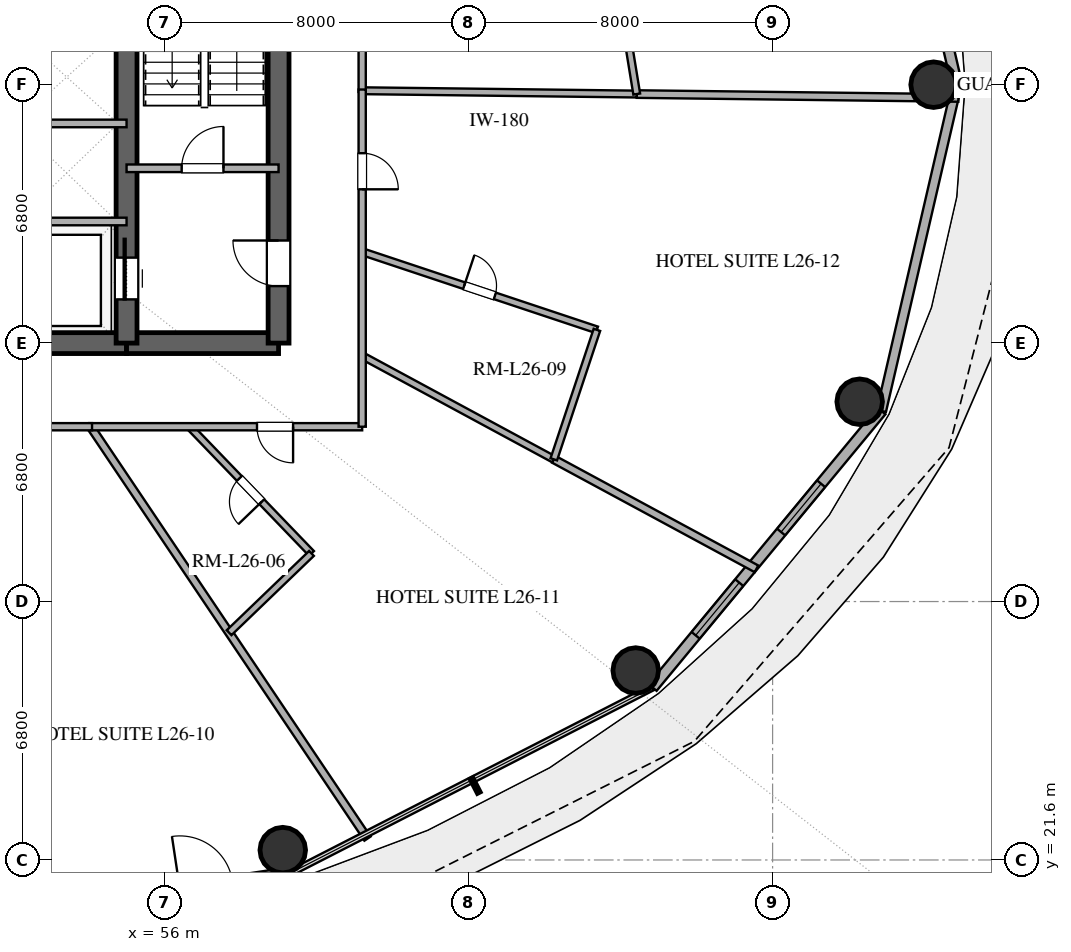
"""IFC4 building model, lengths in metres.
Left out: names, types, materials, properties, quantities, classifications, styles, units other than length and angle.
Written with IfcOpenShell. Run it as: python <this file> out.ifc"""

import sys

from ifc_helpers import new_model, si_unit, direction, frame, frame_2d, origin, origin_2d, place, context, subcontext, project, spatial, rectangle, hollow_circle, extrude, element, fill, save


model = new_model("IFC4")
c1 = context("Model", 3, precision=1e-05, world=origin(), true_north=direction((0.0, 1.0)))
c2 = subcontext(c1, "Body", "Model", "MODEL_VIEW")
j1 = project(units=[si_unit("LENGTHUNIT", "METRE"), si_unit("PLANEANGLEUNIT", "RADIAN")], contexts=[c1])
p1 = place(None, origin())
s1 = spatial("IfcSite", under=j1, at=p1, CompositionType="ELEMENT")
p2 = place(p1, origin())
s2 = spatial("IfcBuilding", under=s1, at=p2, CompositionType="ELEMENT")
p3 = place(p2, frame((0.0, 0.0, 105.6)))
s3 = spatial("IfcBuildingStorey", under=s2, at=p3, CompositionType="ELEMENT", Elevation=105.6)
p4 = place(p3, frame((41.0, 35.2, 0.0), z_axis=(0.0, 0.0, 1.0), x_axis=(1.0, 0.0, 0.0)))
e1 = element("IfcWall", 1, at=p4, inside=s3, PredefinedType="SHEAR", context=c2, shape_type="SweptSolid", body=[
    extrude(rectangle(XDim=14.0, YDim=0.55, at=frame_2d((7.0, 0.0))), origin(), (0.0, 0.0, 1.0), 3.38),
])
p5 = place(p4, frame((6.1, 0.0, 0.0)))
e2 = element("IfcOpeningElement", 2, at=p5, cuts=e1, PredefinedType="OPENING", context=c2, shape_type="SweptSolid", body=[
    extrude(rectangle(XDim=1.8, YDim=2.25, at=frame_2d((0.9, 1.125))), frame((0.0, 0.285, 0.0), z_axis=(0.0, -1.0, 0.0), x_axis=(1.0, 0.0, 0.0)), (0.0, 0.0, 1.0), 0.57),
])
p6 = place(p3, frame((55.0, 35.2, 0.0), z_axis=(0.0, 0.0, 1.0), x_axis=(1.0, 0.0, 0.0)))
e3 = element("IfcWall", 3, at=p6, inside=s3, PredefinedType="SHEAR", context=c2, shape_type="SweptSolid", body=[
    extrude(rectangle(XDim=4.0, YDim=0.55, at=frame_2d((2.0, 0.0))), origin(), (0.0, 0.0, 1.0), 3.38),
])
p7 = place(p3, frame((59.0, 35.2, 0.0), z_axis=(0.0, 0.0, 1.0), x_axis=(0.0, 1.0, 0.0)))
e4 = element("IfcWall", 4, at=p7, inside=s3, PredefinedType="SHEAR", context=c2, shape_type="SweptSolid", body=[
    extrude(rectangle(XDim=13.6, YDim=0.55, at=frame_2d((6.8, 0.0))), origin(), (0.0, 0.0, 1.0), 3.38),
])
p8 = place(p7, frame((1.5, 0.0, 0.0)))
e5 = element("IfcOpeningElement", 5, at=p8, cuts=e4, PredefinedType="OPENING", context=c2, shape_type="SweptSolid", body=[
    extrude(rectangle(XDim=1.2, YDim=2.15, at=frame_2d((0.6, 1.075))), frame((0.0, 0.285, 0.0), z_axis=(0.0, -1.0, 0.0), x_axis=(1.0, 0.0, 0.0)), (0.0, 0.0, 1.0), 0.57),
])
p9 = place(p3, frame((55.0, 35.2, 0.0), z_axis=(0.0, 0.0, 1.0), x_axis=(0.0, 1.0, 0.0)))
e6 = element("IfcWall", 6, at=p9, inside=s3, PredefinedType="SHEAR", context=c2, shape_type="SweptSolid", body=[
    extrude(rectangle(XDim=13.6, YDim=0.55, at=frame_2d((6.8, 0.0))), origin(), (0.0, 0.0, 1.0), 3.38),
])
p10 = place(p9, frame((1.15, 0.0, 0.0)))
e7 = element("IfcOpeningElement", 7, at=p10, cuts=e6, PredefinedType="OPENING", context=c2, shape_type="SweptSolid", body=[
    extrude(rectangle(XDim=1.1, YDim=2.2, at=frame_2d((0.55, 1.1))), frame((0.0, 0.285, 0.0), z_axis=(0.0, -1.0, 0.0), x_axis=(1.0, 0.0, 0.0)), (0.0, 0.0, 1.0), 0.57),
])
for number, where, z_axis, x_axis in (
    (8, (76.237, 42.0, 0.0), (0.0, 0.0, 1.0), (1.0, 0.0, 0.0)),
    (9, (59.11, 21.859, 0.0), (0.0, 0.0, 1.0), (1.0, 0.0, 0.0)),
    (10, (68.398, 26.585, 0.0), (0.0, 0.0, 1.0), (1.0, 0.0, 0.0)),
    (11, (74.291, 33.657, 0.0), (0.0, 0.0, 1.0), (1.0, 0.0, 0.0)),
):
    element("IfcColumn", number, at=place(p3, frame(where, z_axis=z_axis, x_axis=x_axis)), inside=s3, PredefinedType="COLUMN", context=c2, shape_type="SweptSolid", body=[
        extrude(hollow_circle(Radius=0.6, WallThickness=0.032, at=origin_2d()), origin(), (0.0, 0.0, 1.0), 3.38),
    ])
p11 = place(p3, frame((76.849, 42.0, 0.0), z_axis=(0.0, 0.0, 1.0), x_axis=(-0.22558597182, 0.974223264616, 0.0)))
e12 = element("IfcWall", 12, at=p11, inside=s3, PredefinedType="SOLIDWALL", context=c2, shape_type="SweptSolid", body=[
    extrude(rectangle(XDim=8.811, YDim=0.28, at=frame_2d((4.405, 0.0))), origin(), (0.0, 0.0, 1.0), 3.38),
])
p12 = place(p11, frame((6.175, 0.0, 0.0)))
e13 = element("IfcOpeningElement", 13, at=p12, cuts=e12, PredefinedType="OPENING", context=c2, shape_type="SweptSolid", body=[
    extrude(rectangle(XDim=1.1, YDim=2.25, at=frame_2d((0.55, 1.125))), frame((0.0, 0.15, 0.0), z_axis=(0.0, -1.0, 0.0), x_axis=(1.0, 0.0, 0.0)), (0.0, 0.0, 1.0), 0.3),
])
p13 = place(p3, frame((48.0, 19.57, 0.0), z_axis=(0.0, 0.0, 1.0), x_axis=(0.988877774656, 0.148730450117, 0.0)))
e14 = element("IfcWall", 14, at=p13, inside=s3, PredefinedType="SOLIDWALL", context=c2, shape_type="SweptSolid", body=[
    extrude(rectangle(XDim=11.479, YDim=0.28, at=frame_2d((5.74, 0.0))), origin(), (0.0, 0.0, 1.0), 3.38),
])
p14 = place(p13, frame((8.497, 0.0, 0.0)))
e15 = element("IfcOpeningElement", 15, at=p14, cuts=e14, PredefinedType="OPENING", context=c2, shape_type="SweptSolid", body=[
    extrude(rectangle(XDim=1.4, YDim=2.2, at=frame_2d((0.7, 1.1))), frame((0.0, 0.15, 0.0), z_axis=(0.0, -1.0, 0.0), x_axis=(1.0, 0.0, 0.0)), (0.0, 0.0, 1.0), 0.3),
])
p15 = place(p3, frame((68.84, 26.14, 0.0), z_axis=(0.0, 0.0, 1.0), x_axis=(0.637505817448, 0.770445541696, 0.0)))
e16 = element("IfcWall", 16, at=p15, inside=s3, PredefinedType="SOLIDWALL", context=c2, shape_type="SweptSolid", body=[
    extrude(rectangle(XDim=9.445, YDim=0.28, at=frame_2d((4.723, 0.0))), origin(), (0.0, 0.0, 1.0), 3.38),
])
p16 = place(p15, frame((1.78, 0.0, 0.85)))
e17 = element("IfcOpeningElement", 17, at=p16, cuts=e16, PredefinedType="OPENING", context=c2, shape_type="SweptSolid", body=[
    extrude(rectangle(XDim=1.8, YDim=2.2, at=frame_2d((0.9, 1.1))), frame((0.0, 0.15, 0.0), z_axis=(0.0, -1.0, 0.0), x_axis=(1.0, 0.0, 0.0)), (0.0, 0.0, 1.0), 0.3),
])
p17 = place(p15, frame((5.308, 0.0, 0.85)))
e18 = element("IfcOpeningElement", 18, at=p17, cuts=e16, PredefinedType="OPENING", context=c2, shape_type="SweptSolid", body=[
    extrude(rectangle(XDim=1.65, YDim=2.0, at=frame_2d((0.825, 1.0))), frame((0.0, 0.15, 0.0), z_axis=(0.0, -1.0, 0.0), x_axis=(1.0, 0.0, 0.0)), (0.0, 0.0, 1.0), 0.3),
])
p18 = place(p3, frame((74.861, 33.417, 0.0), z_axis=(0.0, 0.0, 1.0), x_axis=(0.22558597182, 0.974223264616, 0.0)))
e19 = element("IfcWall", 19, at=p18, inside=s3, PredefinedType="SOLIDWALL", context=c2, shape_type="SweptSolid", body=[
    extrude(rectangle(XDim=8.811, YDim=0.25, at=frame_2d((4.405, 0.0))), origin(), (0.0, 0.0, 1.0), 3.38),
])
p19 = place(p3, frame((55.0, 39.8, 0.0), z_axis=(0.0, 0.0, 1.0), x_axis=(1.0, 0.0, 0.0)))
e20 = element("IfcWall", 20, at=p19, inside=s3, PredefinedType="SOLIDWALL", context=c2, shape_type="SweptSolid", body=[
    extrude(rectangle(XDim=4.0, YDim=0.2, at=frame_2d((2.0, 0.0))), origin(), (0.0, 0.0, 1.0), 2.74),
])
p20 = place(p19, frame((1.45, 0.0, 0.0)))
e21 = element("IfcOpeningElement", 21, at=p20, cuts=e20, PredefinedType="OPENING", context=c2, shape_type="SweptSolid", body=[
    extrude(rectangle(XDim=1.1, YDim=2.15, at=frame_2d((0.55, 1.075))), frame((0.0, 0.11, 0.0), z_axis=(0.0, -1.0, 0.0), x_axis=(1.0, 0.0, 0.0)), (0.0, 0.0, 1.0), 0.22),
])
for number, where, z_axis, x_axis in (
    (22, (52.05, 38.4, 0.0), (0.0, 0.0, 1.0), (1.0, 0.0, 0.0)),
    (23, (52.05, 40.98, 0.0), (0.0, 0.0, 1.0), (1.0, 0.0, 0.0)),
):
    element("IfcWall", number, at=place(p3, frame(where, z_axis=z_axis, x_axis=x_axis)), inside=s3, PredefinedType="SOLIDWALL", context=c2, shape_type="SweptSolid", body=[
        extrude(rectangle(XDim=2.95, YDim=0.2, at=frame_2d((1.475, 0.0))), origin(), (0.0, 0.0, 1.0), 2.74),
    ])
p21 = place(p3, frame((76.888, 41.651, 0.0), z_axis=(0.0, 0.0, 1.0), x_axis=(-0.9999269672, 0.012085539541, 0.0)))
e24 = element("IfcWall", 24, at=p21, inside=s3, PredefinedType="PARTITIONING", context=c2, shape_type="SweptSolid", body=[
    extrude(rectangle(XDim=8.464, YDim=0.2, at=frame_2d((4.232, 0.0))), origin(), (0.0, 0.0, 1.0), 2.74),
])
p22 = place(p3, frame((68.425, 41.753, 0.0), z_axis=(0.0, 0.0, 1.0), x_axis=(-0.999926833816, 0.012096570355, 0.0)))
e25 = element("IfcWall", 25, at=p22, inside=s3, PredefinedType="PLUMBINGWALL", context=c2, shape_type="SweptSolid", body=[
    extrude(rectangle(XDim=7.225, YDim=0.18, at=frame_2d((3.613, 0.0))), origin(), (0.0, 0.0, 1.0), 2.74),
])
p23 = place(p3, frame((54.053, 33.0, 0.0), z_axis=(0.0, 0.0, 1.0), x_axis=(0.558073496329, -0.829791523634, 0.0)))
e26 = element("IfcWall", 26, at=p23, inside=s3, PredefinedType="PARTITIONING", context=c2, shape_type="SweptSolid", body=[
    extrude(rectangle(XDim=13.06, YDim=0.2, at=frame_2d((6.53, 0.0))), origin(), (0.0, 0.0, 1.0), 2.74),
])
p24 = place(p3, frame((61.2, 37.605, 0.0), z_axis=(0.0, 0.0, 1.0), x_axis=(0.948788249983, -0.315912735884, 0.0)))
e27 = element("IfcWall", 27, at=p24, inside=s3, PredefinedType="PLUMBINGWALL", context=c2, shape_type="SweptSolid", body=[
    extrude(rectangle(XDim=6.51, YDim=0.18, at=frame_2d((3.255, 0.0))), origin(), (0.0, 0.0, 1.0), 2.74),
])
p25 = place(p24, frame((2.83, 0.0, 0.0)))
e28 = element("IfcOpeningElement", 28, at=p25, cuts=e27, PredefinedType="OPENING", context=c2, shape_type="SweptSolid", body=[
    extrude(rectangle(XDim=0.85, YDim=2.1, at=frame_2d((0.425, 1.05))), frame((0.0, 0.1, 0.0), z_axis=(0.0, -1.0, 0.0), x_axis=(1.0, 0.0, 0.0)), (0.0, 0.0, 1.0), 0.2),
])
p26 = place(p3, frame((71.576, 29.261, 0.0), z_axis=(0.0, 0.0, 1.0), x_axis=(-0.879774354245, 0.475391507721, 0.0)))
e29 = element("IfcWall", 29, at=p26, inside=s3, PredefinedType="PARTITIONING", context=c2, shape_type="SweptSolid", body=[
    extrude(rectangle(XDim=6.062, YDim=0.2, at=frame_2d((3.031, 0.0))), origin(), (0.0, 0.0, 1.0), 2.74),
])
p27 = place(p3, frame((66.243, 32.143, 0.0), z_axis=(0.0, 0.0, 1.0), x_axis=(-0.879784992633, 0.475371819461, 0.0)))
e30 = element("IfcWall", 30, at=p27, inside=s3, PredefinedType="PLUMBINGWALL", context=c2, shape_type="SweptSolid", body=[
    extrude(rectangle(XDim=5.732, YDim=0.18, at=frame_2d((2.866, 0.0))), origin(), (0.0, 0.0, 1.0), 2.74),
])
p28 = place(p3, frame((59.866, 29.666, 0.0), z_axis=(0.0, 0.0, 1.0), x_axis=(-0.693306956927, 0.720642396392, 0.0)))
e31 = element("IfcWall", 31, at=p28, inside=s3, PredefinedType="PLUMBINGWALL", context=c2, shape_type="SweptSolid", body=[
    extrude(rectangle(XDim=4.626, YDim=0.18, at=frame_2d((2.313, 0.0))), origin(), (0.0, 0.0, 1.0), 2.74),
])
p29 = place(p28, frame((1.888, 0.0, 0.0)))
e32 = element("IfcOpeningElement", 32, at=p29, cuts=e31, PredefinedType="OPENING", context=c2, shape_type="SweptSolid", body=[
    extrude(rectangle(XDim=0.85, YDim=2.1, at=frame_2d((0.425, 1.05))), frame((0.0, 0.1, 0.0), z_axis=(0.0, -1.0, 0.0), x_axis=(1.0, 0.0, 0.0)), (0.0, 0.0, 1.0), 0.2),
])
p30 = place(p3, frame((61.2, 33.0, 0.0), z_axis=(0.0, 0.0, 1.0), x_axis=(-1.0, 0.0, 0.0)))
e33 = element("IfcWall", 33, at=p30, inside=s3, PredefinedType="PARTITIONING", context=c2, shape_type="SweptSolid", body=[
    extrude(rectangle(XDim=7.186, YDim=0.19, at=frame_2d((3.593, 0.0))), origin(), (0.0, 0.0, 1.0), 2.74),
])
p31 = place(p30, frame((1.818, 0.0, 0.0)))
e34 = element("IfcOpeningElement", 34, at=p31, cuts=e33, PredefinedType="OPENING", context=c2, shape_type="SweptSolid", body=[
    extrude(rectangle(XDim=0.95, YDim=2.15, at=frame_2d((0.475, 1.075))), frame((0.0, 0.105, 0.0), z_axis=(0.0, -1.0, 0.0), x_axis=(1.0, 0.0, 0.0)), (0.0, 0.0, 1.0), 0.21),
])
p32 = place(p3, frame((61.2, 41.809, 0.0), z_axis=(0.0, 0.0, 1.0), x_axis=(0.0, 1.0, 0.0)))
e35 = element("IfcWall", 35, at=p32, inside=s3, PredefinedType="PARTITIONING", context=c2, shape_type="SweptSolid", body=[
    extrude(rectangle(XDim=6.917, YDim=0.19, at=frame_2d((3.458, 0.0))), origin(), (0.0, 0.0, 1.0), 2.74),
])
p33 = place(p32, frame((4.157, 0.0, 0.0)))
e36 = element("IfcOpeningElement", 36, at=p33, cuts=e35, PredefinedType="OPENING", context=c2, shape_type="SweptSolid", body=[
    extrude(rectangle(XDim=0.95, YDim=2.15, at=frame_2d((0.475, 1.075))), frame((0.0, 0.105, 0.0), z_axis=(0.0, -1.0, 0.0), x_axis=(1.0, 0.0, 0.0)), (0.0, 0.0, 1.0), 0.21),
])
p34 = place(p3, frame((61.2, 41.873, 0.0), z_axis=(0.0, 0.0, 1.0), x_axis=(0.0, -1.0, 0.0)))
e37 = element("IfcWall", 37, at=p34, inside=s3, PredefinedType="PARTITIONING", context=c2, shape_type="SweptSolid", body=[
    extrude(rectangle(XDim=8.873, YDim=0.19, at=frame_2d((4.436, 0.0))), origin(), (0.0, 0.0, 1.0), 2.74),
])
p35 = place(p34, frame((1.676, 0.0, 0.0)))
e38 = element("IfcOpeningElement", 38, at=p35, cuts=e37, PredefinedType="OPENING", context=c2, shape_type="SweptSolid", body=[
    extrude(rectangle(XDim=0.95, YDim=2.15, at=frame_2d((0.475, 1.075))), frame((0.0, 0.105, 0.0), z_axis=(0.0, -1.0, 0.0), x_axis=(1.0, 0.0, 0.0)), (0.0, 0.0, 1.0), 0.21),
])
p36 = place(p3, frame((67.377, 35.548, 0.0), z_axis=(0.0, 0.0, 1.0), x_axis=(-0.315860462711, -0.948805653491, 0.0)))
e39 = element("IfcWall", 39, at=p36, inside=s3, PredefinedType="PLUMBINGWALL", context=c2, shape_type="SweptSolid", body=[
    extrude(rectangle(XDim=3.59, YDim=0.18, at=frame_2d((1.795, 0.0))), origin(), (0.0, 0.0, 1.0), 2.74),
])
p37 = place(p3, frame((67.855, 45.243, 0.0), z_axis=(0.0, 0.0, 1.0), x_axis=(0.161207379819, -0.986920554397, 0.0)))
e40 = element("IfcWall", 40, at=p37, inside=s3, PredefinedType="PLUMBINGWALL", context=c2, shape_type="SweptSolid", body=[
    extrude(rectangle(XDim=3.536, YDim=0.18, at=frame_2d((1.768, 0.0))), origin(), (0.0, 0.0, 1.0), 2.74),
])
p38 = place(p3, frame((54.092, 33.0, 0.0), z_axis=(0.0, 0.0, 1.0), x_axis=(-1.0, 0.0, 0.0)))
e41 = element("IfcWall", 41, at=p38, inside=s3, PredefinedType="PARTITIONING", context=c2, shape_type="SweptSolid", body=[
    extrude(rectangle(XDim=3.51, YDim=0.19, at=frame_2d((1.755, 0.0))), origin(), (0.0, 0.0, 1.0), 2.74),
])
p39 = place(p38, frame((1.28, 0.0, 0.0)))
e42 = element("IfcOpeningElement", 42, at=p39, cuts=e41, PredefinedType="OPENING", context=c2, shape_type="SweptSolid", body=[
    extrude(rectangle(XDim=0.95, YDim=2.15, at=frame_2d((0.475, 1.075))), frame((0.0, 0.105, 0.0), z_axis=(0.0, -1.0, 0.0), x_axis=(1.0, 0.0, 0.0)), (0.0, 0.0, 1.0), 0.21),
])
p40 = place(p3, frame((57.698, 27.58, 0.0), z_axis=(0.0, 0.0, 1.0), x_axis=(0.720688028056, 0.693259522991, 0.0)))
e43 = element("IfcWall", 43, at=p40, inside=s3, PredefinedType="PLUMBINGWALL", context=c2, shape_type="SweptSolid", body=[
    extrude(rectangle(XDim=3.009, YDim=0.18, at=frame_2d((1.504, 0.0))), origin(), (0.0, 0.0, 1.0), 2.74),
])
p41 = place(p16, origin())
e44 = element("IfcWindow", 44, at=p41, inside=s3, PartitioningType="SINGLE_PANEL", PredefinedType="WINDOW", context=c2, shape_type="SweptSolid", body=[
    extrude(rectangle(XDim=1.8, YDim=2.2, at=frame_2d((0.9, 1.1))), frame((0.0, 0.03, 0.0), z_axis=(0.0, -1.0, 0.0), x_axis=(1.0, 0.0, 0.0)), (0.0, 0.0, 1.0), 0.06),
])
fill(e17, e44)
p42 = place(p17, origin())
e45 = element("IfcWindow", 45, at=p42, inside=s3, PartitioningType="SINGLE_PANEL", PredefinedType="WINDOW", context=c2, shape_type="SweptSolid", body=[
    extrude(rectangle(XDim=1.65, YDim=2.0, at=frame_2d((0.825, 1.0))), frame((0.0, 0.03, 0.0), z_axis=(0.0, -1.0, 0.0), x_axis=(1.0, 0.0, 0.0)), (0.0, 0.0, 1.0), 0.06),
])
fill(e18, e45)
p43 = place(p10, origin())
e46 = element("IfcDoor", 46, at=p43, inside=s3, OperationType="SLIDING_TO_RIGHT", PredefinedType="DOOR", context=c2, shape_type="SweptSolid", body=[
    extrude(rectangle(XDim=1.1, YDim=2.2, at=frame_2d((0.55, 1.1))), frame((0.0, 0.025, 0.0), z_axis=(0.0, -1.0, 0.0), x_axis=(1.0, 0.0, 0.0)), (0.0, 0.0, 1.0), 0.05),
])
fill(e7, e46)
p44 = place(p8, origin())
e47 = element("IfcDoor", 47, at=p44, inside=s3, OperationType="SINGLE_SWING_RIGHT", PredefinedType="DOOR", context=c2, shape_type="SweptSolid", body=[
    extrude(rectangle(XDim=1.2, YDim=2.15, at=frame_2d((0.6, 1.075))), frame((0.0, 0.025, 0.0), z_axis=(0.0, -1.0, 0.0), x_axis=(1.0, 0.0, 0.0)), (0.0, 0.0, 1.0), 0.05),
])
fill(e5, e47)
p45 = place(p20, origin())
e48 = element("IfcDoor", 48, at=p45, inside=s3, OperationType="SINGLE_SWING_RIGHT", PredefinedType="DOOR", context=c2, shape_type="SweptSolid", body=[
    extrude(rectangle(XDim=1.1, YDim=2.15, at=frame_2d((0.55, 1.075))), frame((0.0, 0.025, 0.0), z_axis=(0.0, -1.0, 0.0), x_axis=(1.0, 0.0, 0.0)), (0.0, 0.0, 1.0), 0.05),
])
fill(e21, e48)
p46 = place(p25, origin())
e49 = element("IfcDoor", 49, at=p46, inside=s3, OperationType="SINGLE_SWING_LEFT", PredefinedType="DOOR", context=c2, shape_type="SweptSolid", body=[
    extrude(rectangle(XDim=0.85, YDim=2.1, at=frame_2d((0.425, 1.05))), frame((0.0, 0.025, 0.0), z_axis=(0.0, -1.0, 0.0), x_axis=(1.0, 0.0, 0.0)), (0.0, 0.0, 1.0), 0.05),
])
fill(e28, e49)
p47 = place(p29, origin())
e50 = element("IfcDoor", 50, at=p47, inside=s3, OperationType="SINGLE_SWING_LEFT", PredefinedType="DOOR", context=c2, shape_type="SweptSolid", body=[
    extrude(rectangle(XDim=0.85, YDim=2.1, at=frame_2d((0.425, 1.05))), frame((0.0, 0.025, 0.0), z_axis=(0.0, -1.0, 0.0), x_axis=(1.0, 0.0, 0.0)), (0.0, 0.0, 1.0), 0.05),
])
fill(e32, e50)
p48 = place(p31, origin())
e51 = element("IfcDoor", 51, at=p48, inside=s3, OperationType="SINGLE_SWING_LEFT", PredefinedType="DOOR", context=c2, shape_type="SweptSolid", body=[
    extrude(rectangle(XDim=0.95, YDim=2.15, at=frame_2d((0.475, 1.075))), frame((0.0, 0.025, 0.0), z_axis=(0.0, -1.0, 0.0), x_axis=(1.0, 0.0, 0.0)), (0.0, 0.0, 1.0), 0.05),
])
fill(e34, e51)
p49 = place(p35, origin())
e52 = element("IfcDoor", 52, at=p49, inside=s3, OperationType="SINGLE_SWING_RIGHT", PredefinedType="DOOR", context=c2, shape_type="SweptSolid", body=[
    extrude(rectangle(XDim=0.95, YDim=2.15, at=frame_2d((0.475, 1.075))), frame((0.0, 0.025, 0.0), z_axis=(0.0, -1.0, 0.0), x_axis=(1.0, 0.0, 0.0)), (0.0, 0.0, 1.0), 0.05),
])
fill(e38, e52)
save(model, sys.argv[1])
